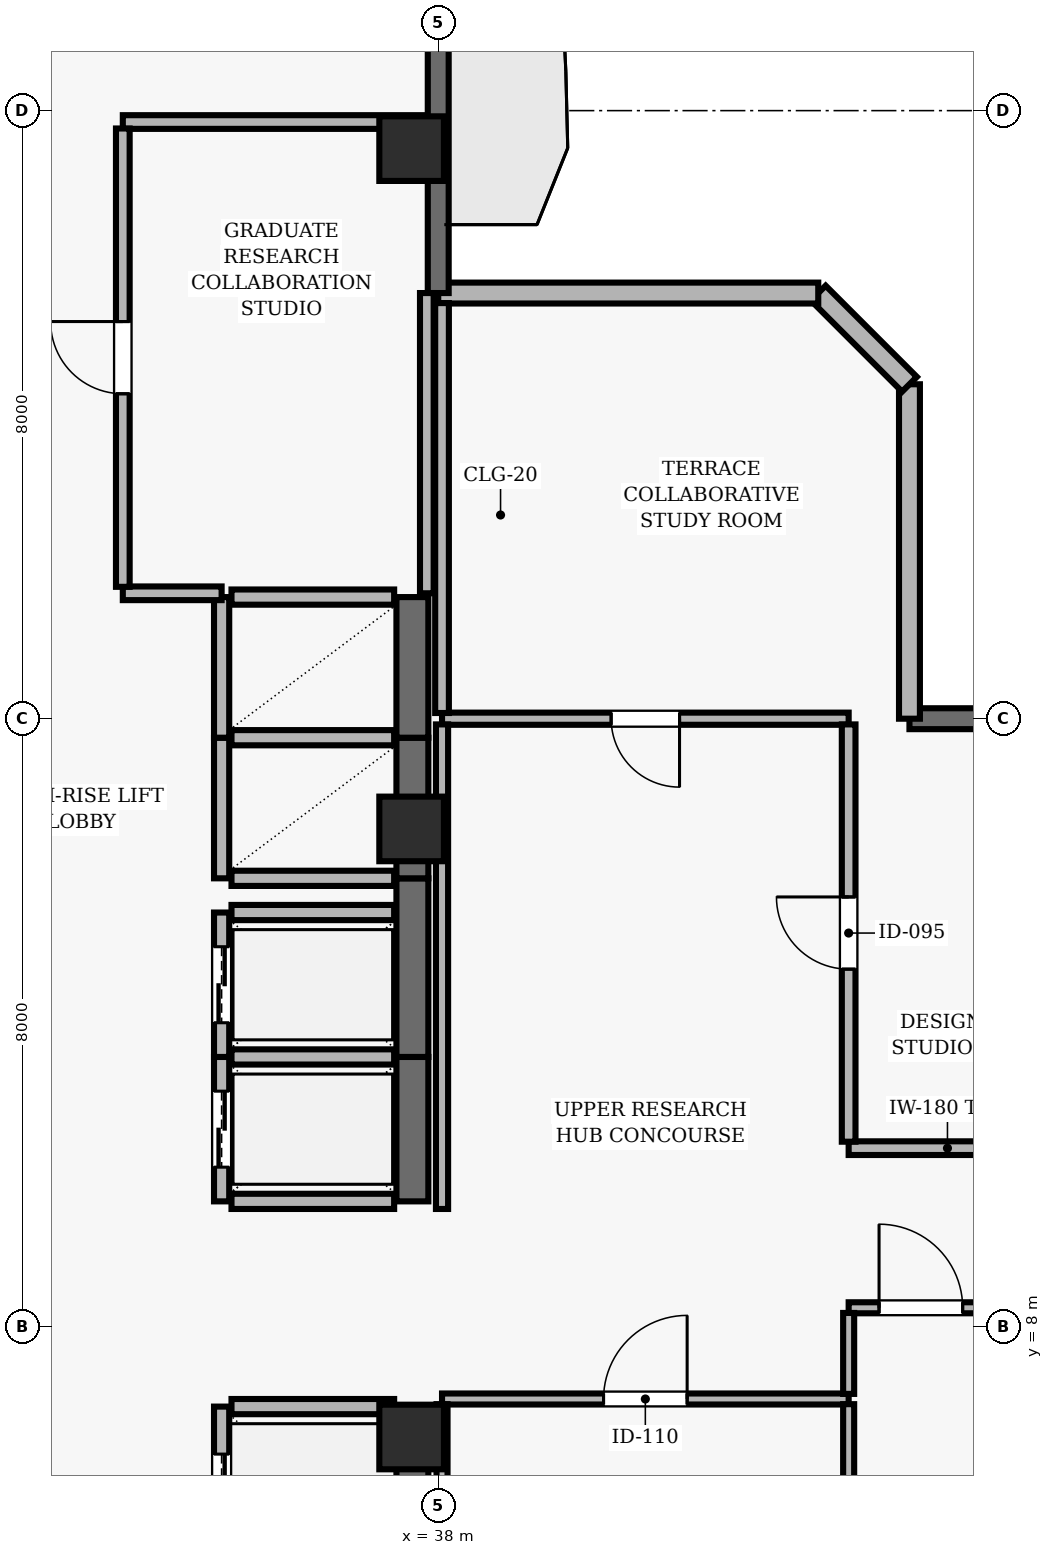
"""IFC4 building model, lengths in metres.
Left out: names, types, materials, properties, quantities, classifications, styles, units other than length and angle.
Written with IfcOpenShell. Run it as: python <this file> out.ifc"""

import sys

from ifc_helpers import new_model, si_unit, direction, frame, frame_2d, origin, origin_2d, place, context, subcontext, project, spatial, rectangle, extrude, element, fill, save


model = new_model("IFC4")
c1 = context("Model", 3, precision=1e-05, world=origin(), true_north=direction((0.0, 1.0)))
c2 = subcontext(c1, "Body", "Model", "MODEL_VIEW")
j1 = project(units=[si_unit("LENGTHUNIT", "METRE"), si_unit("PLANEANGLEUNIT", "RADIAN")], contexts=[c1])
p1 = place(None, origin())
s1 = spatial("IfcSite", under=j1, at=p1, CompositionType="ELEMENT")
p2 = place(p1, origin())
s2 = spatial("IfcBuilding", under=s1, at=p2, CompositionType="ELEMENT")
p3 = place(p2, frame((0.0, 0.0, 283.3)))
s3 = spatial("IfcBuildingStorey", under=s2, at=p3, CompositionType="ELEMENT", Elevation=283.3)
for number, where, z_axis, x_axis in (
    (1, (37.65, 6.55, 0.0), (0.0, 0.0, 1.0), (1.0, 0.0, 0.0)),
    (2, (37.65, 14.55, 0.0), (0.0, 0.0, 1.0), (1.0, 0.0, 0.0)),
    (3, (37.65, 23.5, 0.0), (0.0, 0.0, 1.0), (1.0, 0.0, 0.0)),
):
    element("IfcColumn", number, at=place(p3, frame(where, z_axis=z_axis, x_axis=x_axis)), inside=s3, PredefinedType="COLUMN", context=c2, shape_type="SweptSolid", body=[
        extrude(rectangle(XDim=0.85, YDim=0.85, at=origin_2d()), origin(), (0.0, 0.0, 1.0), 3.9),
    ])
p4 = place(p3, frame((57.3, 16.0, 0.0), z_axis=(0.0, 0.0, 1.0), x_axis=(-1.0, 0.0, 0.0)))
e4 = element("IfcWall", 4, at=p4, inside=s3, PredefinedType="SOLIDWALL", context=c2, shape_type="SweptSolid", body=[
    extrude(rectangle(XDim=13.1, YDim=0.275, at=frame_2d((6.55, 0.0))), origin(), (0.0, 0.0, 1.0), 3.69),
])
p5 = place(p4, frame((8.15, 0.0, 0.0)))
e5 = element("IfcOpeningElement", 5, at=p5, cuts=e4, PredefinedType="OPENING", context=c2, shape_type="SweptSolid", body=[
    extrude(rectangle(XDim=1.0, YDim=2.2, at=frame_2d((0.5, 1.1))), frame((0.0, 0.147, 0.0), z_axis=(0.0, -1.0, 0.0), x_axis=(1.0, 0.0, 0.0)), (0.0, 0.0, 1.0), 0.295),
])
p6 = place(p3, frame((44.2, 16.0, 0.0), z_axis=(0.0, 0.0, 1.0), x_axis=(0.0, 1.0, 0.0)))
e6 = element("IfcWall", 6, at=p6, inside=s3, PredefinedType="SOLIDWALL", context=c2, shape_type="SweptSolid", body=[
    extrude(rectangle(XDim=4.4, YDim=0.275, at=frame_2d((2.2, 0.0))), origin(), (0.0, 0.0, 1.0), 3.69),
])
p7 = place(p3, frame((44.2, 20.4, 0.0), z_axis=(0.0, 0.0, 1.0), x_axis=(-0.707034851297, 0.707178703759, 0.0)))
e7 = element("IfcWall", 7, at=p7, inside=s3, PredefinedType="SOLIDWALL", context=c2, shape_type="SweptSolid", body=[
    extrude(rectangle(XDim=1.697, YDim=0.275, at=frame_2d((0.849, 0.0))), origin(), (0.0, 0.0, 1.0), 3.69),
])
p8 = place(p3, frame((43.0, 21.6, 0.0), z_axis=(0.0, 0.0, 1.0), x_axis=(-1.0, 0.0, 0.0)))
e8 = element("IfcWall", 8, at=p8, inside=s3, PredefinedType="SOLIDWALL", context=c2, shape_type="SweptSolid", body=[
    extrude(rectangle(XDim=5.0, YDim=0.275, at=frame_2d((2.5, 0.0))), origin(), (0.0, 0.0, 1.0), 3.69),
])
p9 = place(p3, frame((38.0, 21.6, 0.0), z_axis=(0.0, 0.0, 1.0), x_axis=(0.0, 1.0, 0.0)))
e9 = element("IfcWall", 9, at=p9, inside=s3, PredefinedType="SOLIDWALL", context=c2, shape_type="SweptSolid", body=[
    extrude(rectangle(XDim=13.7, YDim=0.275, at=frame_2d((6.85, 0.0))), origin(), (0.0, 0.0, 1.0), 3.69),
])
p10 = place(p9, frame((5.35, 0.0, 0.0)))
e10 = element("IfcOpeningElement", 10, at=p10, cuts=e9, PredefinedType="OPENING", context=c2, shape_type="SweptSolid", body=[
    extrude(rectangle(XDim=1.0, YDim=2.2, at=frame_2d((0.5, 1.1))), frame((0.0, 0.147, 0.0), z_axis=(0.0, -1.0, 0.0), x_axis=(1.0, 0.0, 0.0)), (0.0, 0.0, 1.0), 0.295),
])
p11 = place(p9, frame((9.525, 0.0, 0.9)))
e11 = element("IfcOpeningElement", 11, at=p11, cuts=e9, PredefinedType="OPENING", context=c2, shape_type="SweptSolid", body=[
    extrude(rectangle(XDim=1.5, YDim=1.8, at=frame_2d((0.75, 0.9))), frame((0.0, 0.147, 0.0), z_axis=(0.0, -1.0, 0.0), x_axis=(1.0, 0.0, 0.0)), (0.0, 0.0, 1.0), 0.295),
])
p12 = place(p3, frame((35.15, 6.95, 0.0), z_axis=(0.0, 0.0, 1.0), x_axis=(0.0, -1.0, 0.0)))
e12 = element("IfcWall", 12, at=p12, inside=s3, PredefinedType="SOLIDWALL", context=c2, shape_type="SweptSolid", body=[
    extrude(rectangle(XDim=2.25, YDim=0.2, at=frame_2d((1.125, 0.0))), origin(), (0.0, 0.0, 1.0), 3.69),
])
p13 = place(p12, frame((0.625, 0.0, 0.0)))
e13 = element("IfcOpeningElement", 13, at=p13, cuts=e12, PredefinedType="OPENING", context=c2, shape_type="SweptSolid", body=[
    extrude(rectangle(XDim=1.0, YDim=2.1, at=frame_2d((0.5, 1.05))), frame((0.0, 0.11, 0.0), z_axis=(0.0, -1.0, 0.0), x_axis=(1.0, 0.0, 0.0)), (0.0, 0.0, 1.0), 0.22),
])
p14 = place(p3, frame((37.66, 4.7, 0.0), z_axis=(0.0, 0.0, 1.0), x_axis=(0.0, 1.0, 0.0)))
e14 = element("IfcWall", 14, at=p14, inside=s3, PredefinedType="SHEAR", context=c2, shape_type="SweptSolid", body=[
    extrude(rectangle(XDim=2.25, YDim=0.42, at=frame_2d((1.125, 0.0))), origin(), (0.0, 0.0, 1.0), 3.69),
])
p15 = place(p3, frame((37.42, 6.95, 0.0), z_axis=(0.0, 0.0, 1.0), x_axis=(-1.0, 0.0, 0.0)))
e15 = element("IfcWall", 15, at=p15, inside=s3, PredefinedType="SOLIDWALL", context=c2, shape_type="SweptSolid", body=[
    extrude(rectangle(XDim=2.14, YDim=0.2, at=frame_2d((1.07, 0.0))), origin(), (0.0, 0.0, 1.0), 3.69),
])
p16 = place(p3, frame((35.15, 11.55, 0.0), z_axis=(0.0, 0.0, 1.0), x_axis=(0.0, -1.0, 0.0)))
e16 = element("IfcWall", 16, at=p16, inside=s3, PredefinedType="SOLIDWALL", context=c2, shape_type="SweptSolid", body=[
    extrude(rectangle(XDim=1.9, YDim=0.2, at=frame_2d((0.95, 0.0))), origin(), (0.0, 0.0, 1.0), 3.69),
])
p17 = place(p16, frame((0.45, 0.0, 0.0)))
e17 = element("IfcOpeningElement", 17, at=p17, cuts=e16, PredefinedType="OPENING", context=c2, shape_type="SweptSolid", body=[
    extrude(rectangle(XDim=1.0, YDim=2.1, at=frame_2d((0.5, 1.05))), frame((0.0, 0.11, 0.0), z_axis=(0.0, -1.0, 0.0), x_axis=(1.0, 0.0, 0.0)), (0.0, 0.0, 1.0), 0.22),
])
p18 = place(p3, frame((37.66, 9.65, 0.0), z_axis=(0.0, 0.0, 1.0), x_axis=(0.0, 1.0, 0.0)))
e18 = element("IfcWall", 18, at=p18, inside=s3, PredefinedType="SHEAR", context=c2, shape_type="SweptSolid", body=[
    extrude(rectangle(XDim=1.9, YDim=0.42, at=frame_2d((0.95, 0.0))), origin(), (0.0, 0.0, 1.0), 3.69),
])
for number, where, z_axis, x_axis in (
    (19, (35.28, 9.65, 0.0), (0.0, 0.0, 1.0), (1.0, 0.0, 0.0)),
    (20, (37.42, 11.55, 0.0), (0.0, 0.0, 1.0), (-1.0, 0.0, 0.0)),
):
    element("IfcWall", number, at=place(p3, frame(where, z_axis=z_axis, x_axis=x_axis)), inside=s3, PredefinedType="SOLIDWALL", context=c2, shape_type="SweptSolid", body=[
        extrude(rectangle(XDim=2.14, YDim=0.2, at=frame_2d((1.07, 0.0))), origin(), (0.0, 0.0, 1.0), 3.69),
    ])
p19 = place(p3, frame((35.15, 13.45, 0.0), z_axis=(0.0, 0.0, 1.0), x_axis=(0.0, -1.0, 0.0)))
e21 = element("IfcWall", 21, at=p19, inside=s3, PredefinedType="SOLIDWALL", context=c2, shape_type="SweptSolid", body=[
    extrude(rectangle(XDim=1.9, YDim=0.2, at=frame_2d((0.95, 0.0))), origin(), (0.0, 0.0, 1.0), 3.69),
])
p20 = place(p19, frame((0.45, 0.0, 0.0)))
e22 = element("IfcOpeningElement", 22, at=p20, cuts=e21, PredefinedType="OPENING", context=c2, shape_type="SweptSolid", body=[
    extrude(rectangle(XDim=1.0, YDim=2.1, at=frame_2d((0.5, 1.05))), frame((0.0, 0.11, 0.0), z_axis=(0.0, -1.0, 0.0), x_axis=(1.0, 0.0, 0.0)), (0.0, 0.0, 1.0), 0.22),
])
p21 = place(p3, frame((37.66, 11.55, 0.0), z_axis=(0.0, 0.0, 1.0), x_axis=(0.0, 1.0, 0.0)))
e23 = element("IfcWall", 23, at=p21, inside=s3, PredefinedType="SHEAR", context=c2, shape_type="SweptSolid", body=[
    extrude(rectangle(XDim=2.35, YDim=0.42, at=frame_2d((1.175, 0.0))), origin(), (0.0, 0.0, 1.0), 3.69),
])
p22 = place(p3, frame((37.42, 13.45, 0.0), z_axis=(0.0, 0.0, 1.0), x_axis=(-1.0, 0.0, 0.0)))
e24 = element("IfcWall", 24, at=p22, inside=s3, PredefinedType="SOLIDWALL", context=c2, shape_type="SweptSolid", body=[
    extrude(rectangle(XDim=2.14, YDim=0.2, at=frame_2d((1.07, 0.0))), origin(), (0.0, 0.0, 1.0), 3.69),
])
p23 = place(p3, frame((35.15, 15.75, 0.0), z_axis=(0.0, 0.0, 1.0), x_axis=(0.0, -1.0, 0.0)))
e25 = element("IfcWall", 25, at=p23, inside=s3, PredefinedType="SOLIDWALL", context=c2, shape_type="SweptSolid", body=[
    extrude(rectangle(XDim=1.85, YDim=0.2, at=frame_2d((0.925, 0.0))), origin(), (0.0, 0.0, 1.0), 3.69),
])
p24 = place(p3, frame((37.66, 13.9, 0.0), z_axis=(0.0, 0.0, 1.0), x_axis=(0.0, 1.0, 0.0)))
e26 = element("IfcWall", 26, at=p24, inside=s3, PredefinedType="SHEAR", context=c2, shape_type="SweptSolid", body=[
    extrude(rectangle(XDim=1.85, YDim=0.42, at=frame_2d((0.925, 0.0))), origin(), (0.0, 0.0, 1.0), 3.69),
])
for number, where, z_axis, x_axis in (
    (27, (35.28, 13.9, 0.0), (0.0, 0.0, 1.0), (1.0, 0.0, 0.0)),
    (28, (37.42, 15.75, 0.0), (0.0, 0.0, 1.0), (-1.0, 0.0, 0.0)),
):
    element("IfcWall", number, at=place(p3, frame(where, z_axis=z_axis, x_axis=x_axis)), inside=s3, PredefinedType="SOLIDWALL", context=c2, shape_type="SweptSolid", body=[
        extrude(rectangle(XDim=2.14, YDim=0.2, at=frame_2d((1.07, 0.0))), origin(), (0.0, 0.0, 1.0), 3.69),
    ])
p25 = place(p3, frame((35.15, 17.6, 0.0), z_axis=(0.0, 0.0, 1.0), x_axis=(0.0, -1.0, 0.0)))
e29 = element("IfcWall", 29, at=p25, inside=s3, PredefinedType="SOLIDWALL", context=c2, shape_type="SweptSolid", body=[
    extrude(rectangle(XDim=1.85, YDim=0.2, at=frame_2d((0.925, 0.0))), origin(), (0.0, 0.0, 1.0), 3.69),
])
p26 = place(p3, frame((37.66, 15.75, 0.0), z_axis=(0.0, 0.0, 1.0), x_axis=(0.0, 1.0, 0.0)))
e30 = element("IfcWall", 30, at=p26, inside=s3, PredefinedType="SHEAR", context=c2, shape_type="SweptSolid", body=[
    extrude(rectangle(XDim=1.85, YDim=0.42, at=frame_2d((0.925, 0.0))), origin(), (0.0, 0.0, 1.0), 3.69),
])
p27 = place(p3, frame((37.42, 17.6, 0.0), z_axis=(0.0, 0.0, 1.0), x_axis=(-1.0, 0.0, 0.0)))
e31 = element("IfcWall", 31, at=p27, inside=s3, PredefinedType="SOLIDWALL", context=c2, shape_type="SweptSolid", body=[
    extrude(rectangle(XDim=2.14, YDim=0.2, at=frame_2d((1.07, 0.0))), origin(), (0.0, 0.0, 1.0), 3.69),
])
p28 = place(p3, frame((33.85, 17.65, 0.0), z_axis=(0.0, 0.0, 1.0), x_axis=(1.0, 0.0, 0.0)))
e32 = element("IfcWall", 32, at=p28, inside=s3, PredefinedType="PARTITIONING", context=c2, shape_type="SweptSolid", body=[
    extrude(rectangle(XDim=1.3, YDim=0.18, at=frame_2d((0.65, 0.0))), origin(), (0.0, 0.0, 1.0), 3.69),
])
p29 = place(p3, frame((37.85, 23.85, 0.0), z_axis=(0.0, 0.0, 1.0), x_axis=(-1.0, 0.0, 0.0)))
e33 = element("IfcWall", 33, at=p29, inside=s3, PredefinedType="PARTITIONING", context=c2, shape_type="SweptSolid", body=[
    extrude(rectangle(XDim=4.0, YDim=0.18, at=frame_2d((2.0, 0.0))), origin(), (0.0, 0.0, 1.0), 3.227),
])
p30 = place(p3, frame((38.05, 7.05, 0.0), z_axis=(0.0, 0.0, 1.0), x_axis=(1.0, 0.0, 0.0)))
e34 = element("IfcWall", 34, at=p30, inside=s3, PredefinedType="PARTITIONING", context=c2, shape_type="SweptSolid", body=[
    extrude(rectangle(XDim=5.35, YDim=0.145, at=frame_2d((2.675, 0.0))), origin(), (0.0, 0.0, 1.0), 3.69),
])
p31 = place(p30, frame((2.125, 0.0, 0.0)))
e35 = element("IfcOpeningElement", 35, at=p31, cuts=e34, PredefinedType="OPENING", context=c2, shape_type="SweptSolid", body=[
    extrude(rectangle(XDim=1.1, YDim=2.15, at=frame_2d((0.55, 1.075))), frame((0.0, 0.083, 0.0), z_axis=(0.0, -1.0, 0.0), x_axis=(1.0, 0.0, 0.0)), (0.0, 0.0, 1.0), 0.165),
])
p32 = place(p3, frame((43.4, 8.25, 0.0), z_axis=(0.0, 0.0, 1.0), x_axis=(1.0, 0.0, 0.0)))
e36 = element("IfcWall", 36, at=p32, inside=s3, PredefinedType="PARTITIONING", context=c2, shape_type="SweptSolid", body=[
    extrude(rectangle(XDim=2.6, YDim=0.145, at=frame_2d((1.3, 0.0))), origin(), (0.0, 0.0, 1.0), 3.227),
])
p33 = place(p32, frame((0.4, 0.0, 0.0)))
e37 = element("IfcOpeningElement", 37, at=p33, cuts=e36, PredefinedType="OPENING", context=c2, shape_type="SweptSolid", body=[
    extrude(rectangle(XDim=1.1, YDim=2.15, at=frame_2d((0.55, 1.075))), frame((0.0, 0.083, 0.0), z_axis=(0.0, -1.0, 0.0), x_axis=(1.0, 0.0, 0.0)), (0.0, 0.0, 1.0), 0.165),
])
p34 = place(p3, frame((43.4, 16.0, 0.0), z_axis=(0.0, 0.0, 1.0), x_axis=(-1.0, 0.0, 0.0)))
e38 = element("IfcWall", 38, at=p34, inside=s3, PredefinedType="PARTITIONING", context=c2, shape_type="SweptSolid", body=[
    extrude(rectangle(XDim=5.35, YDim=0.16, at=frame_2d((2.675, 0.0))), origin(), (0.0, 0.0, 1.0), 3.39),
])
p35 = place(p34, frame((2.225, 0.0, 0.0)))
e39 = element("IfcOpeningElement", 39, at=p35, cuts=e38, PredefinedType="OPENING", context=c2, shape_type="SweptSolid", body=[
    extrude(rectangle(XDim=0.9, YDim=2.1, at=frame_2d((0.45, 1.05))), frame((0.0, 0.09, 0.0), z_axis=(0.0, -1.0, 0.0), x_axis=(1.0, 0.0, 0.0)), (0.0, 0.0, 1.0), 0.18),
])
p36 = place(p3, frame((46.0, 10.35, 0.0), z_axis=(0.0, 0.0, 1.0), x_axis=(-1.0, 0.0, 0.0)))
e40 = element("IfcWall", 40, at=p36, inside=s3, PredefinedType="PARTITIONING", context=c2, shape_type="SweptSolid", body=[
    extrude(rectangle(XDim=2.6, YDim=0.18, at=frame_2d((1.3, 0.0))), origin(), (0.0, 0.0, 1.0), 3.424),
])
p37 = place(p3, frame((33.85, 17.735, 0.0), z_axis=(0.0, 0.0, 1.0), x_axis=(0.0, 1.0, 0.0)))
e41 = element("IfcWall", 41, at=p37, inside=s3, PredefinedType="PARTITIONING", context=c2, shape_type="SweptSolid", body=[
    extrude(rectangle(XDim=6.03, YDim=0.18, at=frame_2d((3.015, 0.0))), origin(), (0.0, 0.0, 1.0), 3.69),
])
p38 = place(p37, frame((2.54, 0.0, 0.0)))
e42 = element("IfcOpeningElement", 42, at=p38, cuts=e41, PredefinedType="OPENING", context=c2, shape_type="SweptSolid", body=[
    extrude(rectangle(XDim=0.95, YDim=2.1, at=frame_2d((0.475, 1.05))), frame((0.0, 0.1, 0.0), z_axis=(0.0, -1.0, 0.0), x_axis=(1.0, 0.0, 0.0)), (0.0, 0.0, 1.0), 0.2),
])
p39 = place(p3, frame((37.85, 17.65, 0.0), z_axis=(0.0, 0.0, 1.0), x_axis=(0.0, 1.0, 0.0)))
e43 = element("IfcWall", 43, at=p39, inside=s3, PredefinedType="PARTITIONING", context=c2, shape_type="SweptSolid", body=[
    extrude(rectangle(XDim=3.95, YDim=0.18, at=frame_2d((1.975, 0.0))), origin(), (0.0, 0.0, 1.0), 3.227),
])
p40 = place(p3, frame((38.05, 6.982, 0.0), z_axis=(0.0, 0.0, 1.0), x_axis=(0.0, -1.0, 0.0)))
e44 = element("IfcWall", 44, at=p40, inside=s3, PredefinedType="PARTITIONING", context=c2, shape_type="SweptSolid", body=[
    extrude(rectangle(XDim=6.849, YDim=0.145, at=frame_2d((3.424, 0.0))), origin(), (0.0, 0.0, 1.0), 3.227),
])
p41 = place(p3, frame((38.05, 15.925, 0.0), z_axis=(0.0, 0.0, 1.0), x_axis=(0.0, -1.0, 0.0)))
e45 = element("IfcWall", 45, at=p41, inside=s3, PredefinedType="PARTITIONING", context=c2, shape_type="SweptSolid", body=[
    extrude(rectangle(XDim=6.375, YDim=0.16, at=frame_2d((3.188, 0.0))), origin(), (0.0, 0.0, 1.0), 3.227),
])
p42 = place(p3, frame((38.05, 21.468, 0.0), z_axis=(0.0, 0.0, 1.0), x_axis=(0.0, -1.0, 0.0)))
e46 = element("IfcWall", 46, at=p42, inside=s3, PredefinedType="PARTITIONING", context=c2, shape_type="SweptSolid", body=[
    extrude(rectangle(XDim=5.393, YDim=0.18, at=frame_2d((2.697, 0.0))), origin(), (0.0, 0.0, 1.0), 3.227),
])
p43 = place(p3, frame((43.4, 0.133, 0.0), z_axis=(0.0, 0.0, 1.0), x_axis=(0.0, 1.0, 0.0)))
e47 = element("IfcWall", 47, at=p43, inside=s3, PredefinedType="PARTITIONING", context=c2, shape_type="SweptSolid", body=[
    extrude(rectangle(XDim=6.849, YDim=0.145, at=frame_2d((3.424, 0.0))), origin(), (0.0, 0.0, 1.0), 3.69),
])
p44 = place(p3, frame((43.4, 7.117, 0.0), z_axis=(0.0, 0.0, 1.0), x_axis=(0.0, 1.0, 0.0)))
e48 = element("IfcWall", 48, at=p44, inside=s3, PredefinedType="PARTITIONING", context=c2, shape_type="SweptSolid", body=[
    extrude(rectangle(XDim=1.065, YDim=0.145, at=frame_2d((0.532, 0.0))), origin(), (0.0, 0.0, 1.0), 3.69),
])
p45 = place(p3, frame((43.4, 10.435, 0.0), z_axis=(0.0, 0.0, 1.0), x_axis=(0.0, 1.0, 0.0)))
e49 = element("IfcWall", 49, at=p45, inside=s3, PredefinedType="PARTITIONING", context=c2, shape_type="SweptSolid", body=[
    extrude(rectangle(XDim=5.49, YDim=0.18, at=frame_2d((2.745, 0.0))), origin(), (0.0, 0.0, 1.0), 3.69),
])
p46 = place(p45, frame((2.27, 0.0, 0.0)))
e50 = element("IfcOpeningElement", 50, at=p46, cuts=e49, PredefinedType="OPENING", context=c2, shape_type="SweptSolid", body=[
    extrude(rectangle(XDim=0.95, YDim=2.1, at=frame_2d((0.475, 1.05))), frame((0.0, 0.1, 0.0), z_axis=(0.0, -1.0, 0.0), x_axis=(1.0, 0.0, 0.0)), (0.0, 0.0, 1.0), 0.2),
])
p47 = place(p13, origin())
e51 = element("IfcDoor", 51, at=p47, inside=s3, OperationType="DOUBLE_DOOR_SLIDING", PredefinedType="DOOR", context=c2, shape_type="SweptSolid", body=[
    extrude(rectangle(XDim=1.0, YDim=2.1, at=frame_2d((0.5, 1.05))), frame((0.0, 0.025, 0.0), z_axis=(0.0, -1.0, 0.0), x_axis=(1.0, 0.0, 0.0)), (0.0, 0.0, 1.0), 0.05),
])
fill(e13, e51)
p48 = place(p17, origin())
e52 = element("IfcDoor", 52, at=p48, inside=s3, OperationType="DOUBLE_DOOR_SLIDING", PredefinedType="DOOR", context=c2, shape_type="SweptSolid", body=[
    extrude(rectangle(XDim=1.0, YDim=2.1, at=frame_2d((0.5, 1.05))), frame((0.0, 0.025, 0.0), z_axis=(0.0, -1.0, 0.0), x_axis=(1.0, 0.0, 0.0)), (0.0, 0.0, 1.0), 0.05),
])
fill(e17, e52)
p49 = place(p20, origin())
e53 = element("IfcDoor", 53, at=p49, inside=s3, OperationType="DOUBLE_DOOR_SLIDING", PredefinedType="DOOR", context=c2, shape_type="SweptSolid", body=[
    extrude(rectangle(XDim=1.0, YDim=2.1, at=frame_2d((0.5, 1.05))), frame((0.0, 0.025, 0.0), z_axis=(0.0, -1.0, 0.0), x_axis=(1.0, 0.0, 0.0)), (0.0, 0.0, 1.0), 0.05),
])
fill(e22, e53)
p50 = place(p38, origin())
e54 = element("IfcDoor", 54, at=p50, inside=s3, OperationType="SINGLE_SWING_RIGHT", PredefinedType="DOOR", context=c2, shape_type="SweptSolid", body=[
    extrude(rectangle(XDim=0.95, YDim=2.1, at=frame_2d((0.475, 1.05))), frame((0.0, 0.025, 0.0), z_axis=(0.0, -1.0, 0.0), x_axis=(1.0, 0.0, 0.0)), (0.0, 0.0, 1.0), 0.05),
])
fill(e42, e54)
p51 = place(p31, origin())
e55 = element("IfcDoor", 55, at=p51, inside=s3, OperationType="SINGLE_SWING_RIGHT", PredefinedType="DOOR", context=c2, shape_type="SweptSolid", body=[
    extrude(rectangle(XDim=1.1, YDim=2.15, at=frame_2d((0.55, 1.075))), frame((0.0, 0.025, 0.0), z_axis=(0.0, -1.0, 0.0), x_axis=(1.0, 0.0, 0.0)), (0.0, 0.0, 1.0), 0.05),
])
fill(e35, e55)
p52 = place(p33, origin())
e56 = element("IfcDoor", 56, at=p52, inside=s3, OperationType="SINGLE_SWING_LEFT", PredefinedType="DOOR", context=c2, shape_type="SweptSolid", body=[
    extrude(rectangle(XDim=1.1, YDim=2.15, at=frame_2d((0.55, 1.075))), frame((0.0, 0.025, 0.0), z_axis=(0.0, -1.0, 0.0), x_axis=(1.0, 0.0, 0.0)), (0.0, 0.0, 1.0), 0.05),
])
fill(e37, e56)
p53 = place(p46, origin())
e57 = element("IfcDoor", 57, at=p53, inside=s3, OperationType="SINGLE_SWING_RIGHT", PredefinedType="DOOR", context=c2, shape_type="SweptSolid", body=[
    extrude(rectangle(XDim=0.95, YDim=2.1, at=frame_2d((0.475, 1.05))), frame((0.0, 0.025, 0.0), z_axis=(0.0, -1.0, 0.0), x_axis=(1.0, 0.0, 0.0)), (0.0, 0.0, 1.0), 0.05),
])
fill(e50, e57)
p54 = place(p35, origin())
e58 = element("IfcDoor", 58, at=p54, inside=s3, OperationType="SINGLE_SWING_LEFT", PredefinedType="DOOR", context=c2, shape_type="SweptSolid", body=[
    extrude(rectangle(XDim=0.9, YDim=2.1, at=frame_2d((0.45, 1.05))), frame((0.0, 0.025, 0.0), z_axis=(0.0, -1.0, 0.0), x_axis=(1.0, 0.0, 0.0)), (0.0, 0.0, 1.0), 0.05),
])
fill(e39, e58)
save(model, sys.argv[1])
